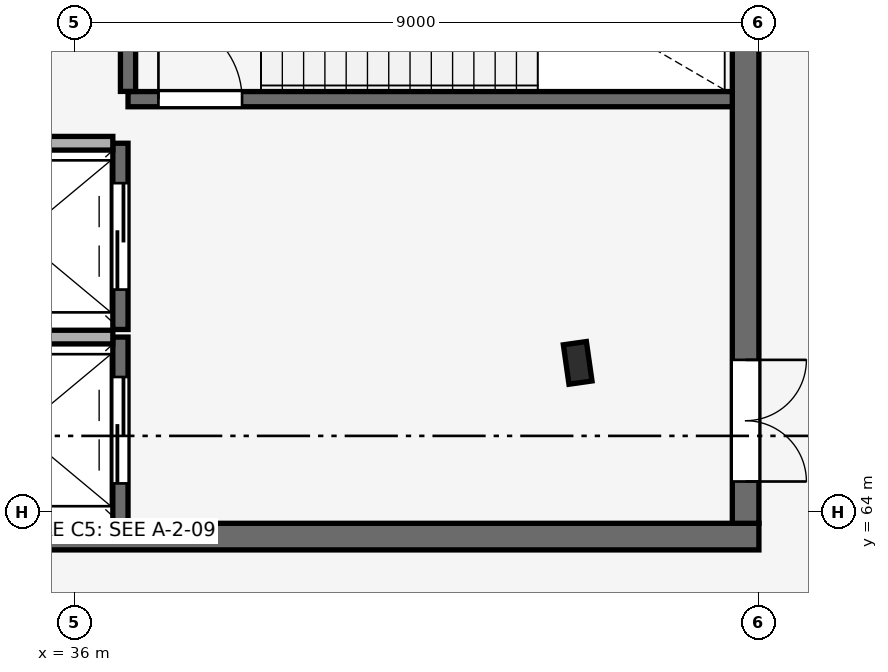
"""IFC4 building model, lengths in metres.
Left out: names, types, materials, properties, quantities, classifications, styles, units other than length and angle.
Written with IfcOpenShell. Run it as: python <this file> out.ifc"""

import sys

from ifc_helpers import new_model, si_unit, direction, frame, frame_2d, origin, origin_2d, place, context, subcontext, project, spatial, rectangle, i_section, extrude, element, fill, save


model = new_model("IFC4")
c1 = context("Model", 3, precision=1e-05, world=origin(), true_north=direction((0.0, 1.0)))
c2 = subcontext(c1, "Body", "Model", "MODEL_VIEW")
j1 = project(units=[si_unit("LENGTHUNIT", "METRE"), si_unit("PLANEANGLEUNIT", "RADIAN")], contexts=[c1])
p1 = place(None, origin())
s1 = spatial("IfcSite", under=j1, at=p1, CompositionType="ELEMENT")
p2 = place(p1, origin())
s2 = spatial("IfcBuilding", under=s1, at=p2, CompositionType="ELEMENT")
p3 = place(p2, frame((0.0, 0.0, 5.4)))
s3 = spatial("IfcBuildingStorey", under=s2, at=p3, CompositionType="ELEMENT", Elevation=5.4)
p4 = place(p3, frame((42.615, 65.96, 0.0), z_axis=(0.0, 0.0, 1.0), x_axis=(-0.989999050734, -0.141074021516, 0.0)))
e1 = element("IfcColumn", 1, at=p4, inside=s3, PredefinedType="COLUMN", context=c2, shape_type="SweptSolid", body=[
    extrude(i_section(OverallWidth=0.306, OverallDepth=0.524, WebThickness=0.021, FlangeThickness=0.04, FilletRadius=0.027, at=origin_2d()), origin(), (0.0, 0.0, 1.0), 4.8),
])
p5 = place(p3, frame((33.6, 63.675, 0.0), z_axis=(0.0, 0.0, 1.0), x_axis=(1.0, 0.0, 0.0)))
e2 = element("IfcWall", 2, at=p5, inside=s3, PredefinedType="SHEAR", context=c2, shape_type="SweptSolid", body=[
    extrude(rectangle(XDim=11.4, YDim=0.35, at=frame_2d((5.7, 0.0))), origin(), (0.0, 0.0, 1.0), 4.8),
])
p6 = place(p3, frame((44.825, 63.85, 0.0), z_axis=(0.0, 0.0, 1.0), x_axis=(0.0, 1.0, 0.0)))
e3 = element("IfcWall", 3, at=p6, inside=s3, PredefinedType="SHEAR", context=c2, shape_type="SweptSolid", body=[
    extrude(rectangle(XDim=9.3, YDim=0.35, at=frame_2d((4.65, 0.0))), origin(), (0.0, 0.0, 1.0), 4.8),
])
p7 = place(p6, frame((0.55, 0.0, 0.0)))
e4 = element("IfcOpeningElement", 4, at=p7, cuts=e3, PredefinedType="OPENING", context=c2, shape_type="SweptSolid", body=[
    extrude(rectangle(XDim=1.6, YDim=2.2, at=frame_2d((0.8, 1.1))), frame((0.0, 0.185, 0.0), z_axis=(0.0, -1.0, 0.0), x_axis=(1.0, 0.0, 0.0)), (0.0, 0.0, 1.0), 0.37),
])
p8 = place(p3, frame((36.6, 63.85, 0.0), z_axis=(0.0, 0.0, 1.0), x_axis=(0.0, 1.0, 0.0)))
e5 = element("IfcWall", 5, at=p8, inside=s3, PredefinedType="SHEAR", context=c2, shape_type="SweptSolid", body=[
    extrude(rectangle(XDim=2.45, YDim=0.2, at=frame_2d((1.225, 0.0))), origin(), (0.0, 0.0, 1.0), 4.52),
])
p9 = place(p8, frame((0.525, 0.0, 0.0)))
e6 = element("IfcOpeningElement", 6, at=p9, cuts=e5, PredefinedType="OPENING", context=c2, shape_type="SweptSolid", body=[
    extrude(rectangle(XDim=1.4, YDim=2.2, at=frame_2d((0.7, 1.1))), frame((0.0, 0.11, 0.0), z_axis=(0.0, -1.0, 0.0), x_axis=(1.0, 0.0, 0.0)), (0.0, 0.0, 1.0), 0.22),
])
p10 = place(p3, frame((34.05, 66.3, 0.0), z_axis=(0.0, 0.0, 1.0), x_axis=(1.0, 0.0, 0.0)))
e7 = element("IfcWall", 7, at=p10, inside=s3, PredefinedType="PARTITIONING", context=c2, shape_type="SweptSolid", body=[
    extrude(rectangle(XDim=2.45, YDim=0.18, at=frame_2d((1.225, 0.0))), origin(), (0.0, 0.0, 1.0), 4.8),
])
p11 = place(p3, frame((36.6, 66.4, 0.0), z_axis=(0.0, 0.0, 1.0), x_axis=(0.0, 1.0, 0.0)))
e8 = element("IfcWall", 8, at=p11, inside=s3, PredefinedType="SHEAR", context=c2, shape_type="SweptSolid", body=[
    extrude(rectangle(XDim=2.45, YDim=0.2, at=frame_2d((1.225, 0.0))), origin(), (0.0, 0.0, 1.0), 4.52),
])
p12 = place(p11, frame((0.525, 0.0, 0.0)))
e9 = element("IfcOpeningElement", 9, at=p12, cuts=e8, PredefinedType="OPENING", context=c2, shape_type="SweptSolid", body=[
    extrude(rectangle(XDim=1.4, YDim=2.2, at=frame_2d((0.7, 1.1))), frame((0.0, 0.11, 0.0), z_axis=(0.0, -1.0, 0.0), x_axis=(1.0, 0.0, 0.0)), (0.0, 0.0, 1.0), 0.22),
])
p13 = place(p3, frame((34.05, 68.85, 0.0), z_axis=(0.0, 0.0, 1.0), x_axis=(1.0, 0.0, 0.0)))
e10 = element("IfcWall", 10, at=p13, inside=s3, PredefinedType="PARTITIONING", context=c2, shape_type="SweptSolid", body=[
    extrude(rectangle(XDim=2.45, YDim=0.18, at=frame_2d((1.225, 0.0))), origin(), (0.0, 0.0, 1.0), 4.8),
])
p14 = place(p3, frame((36.7, 69.43, 0.0), z_axis=(0.0, 0.0, 1.0), x_axis=(1.0, 0.0, 0.0)))
e11 = element("IfcWall", 11, at=p14, inside=s3, PredefinedType="SHEAR", context=c2, shape_type="SweptSolid", body=[
    extrude(rectangle(XDim=7.95, YDim=0.2, at=frame_2d((3.975, 0.0))), origin(), (0.0, 0.0, 1.0), 4.8),
])
p15 = place(p14, frame((0.4, 0.0, 0.0)))
e12 = element("IfcOpeningElement", 12, at=p15, cuts=e11, PredefinedType="OPENING", context=c2, shape_type="SweptSolid", body=[
    extrude(rectangle(XDim=1.1, YDim=2.15, at=frame_2d((0.55, 1.075))), frame((0.0, 0.11, 0.0), z_axis=(0.0, -1.0, 0.0), x_axis=(1.0, 0.0, 0.0)), (0.0, 0.0, 1.0), 0.22),
])
p16 = place(p3, frame((36.7, 69.532, 0.0), z_axis=(0.0, 0.0, 1.0), x_axis=(0.0, 1.0, 0.0)))
e13 = element("IfcWall", 13, at=p16, inside=s3, PredefinedType="SHEAR", context=c2, shape_type="SweptSolid", body=[
    extrude(rectangle(XDim=3.586, YDim=0.2, at=frame_2d((1.793, 0.0))), origin(), (0.0, 0.0, 1.0), 4.8),
])
p17 = place(p9, origin())
e14 = element("IfcDoor", 14, at=p17, inside=s3, OperationType="DOUBLE_DOOR_SLIDING", PredefinedType="DOOR", context=c2, shape_type="SweptSolid", body=[
    extrude(rectangle(XDim=1.4, YDim=2.2, at=frame_2d((0.7, 1.1))), frame((0.0, 0.025, 0.0), z_axis=(0.0, -1.0, 0.0), x_axis=(1.0, 0.0, 0.0)), (0.0, 0.0, 1.0), 0.05),
])
fill(e6, e14)
p18 = place(p12, origin())
e15 = element("IfcDoor", 15, at=p18, inside=s3, OperationType="DOUBLE_DOOR_SLIDING", PredefinedType="DOOR", context=c2, shape_type="SweptSolid", body=[
    extrude(rectangle(XDim=1.4, YDim=2.2, at=frame_2d((0.7, 1.1))), frame((0.0, 0.025, 0.0), z_axis=(0.0, -1.0, 0.0), x_axis=(1.0, 0.0, 0.0)), (0.0, 0.0, 1.0), 0.05),
])
fill(e9, e15)
p19 = place(p15, frame((1.1, 0.0, 0.0), z_axis=(0.0, 0.0, 1.0), x_axis=(-1.0, 0.0, 0.0)))
e16 = element("IfcDoor", 16, at=p19, inside=s3, OperationType="SINGLE_SWING_RIGHT", PredefinedType="DOOR", context=c2, shape_type="SweptSolid", body=[
    extrude(rectangle(XDim=1.1, YDim=2.15, at=frame_2d((0.55, 1.075))), frame((0.0, 0.025, 0.0), z_axis=(0.0, -1.0, 0.0), x_axis=(1.0, 0.0, 0.0)), (0.0, 0.0, 1.0), 0.05),
])
fill(e12, e16)
p20 = place(p7, frame((1.6, 0.0, 0.0), z_axis=(0.0, 0.0, 1.0), x_axis=(-1.0, 0.0, 0.0)))
e17 = element("IfcDoor", 17, at=p20, inside=s3, OperationType="DOUBLE_DOOR_SINGLE_SWING", PredefinedType="DOOR", context=c2, shape_type="SweptSolid", body=[
    extrude(rectangle(XDim=1.6, YDim=2.2, at=frame_2d((0.8, 1.1))), frame((0.0, 0.025, 0.0), z_axis=(0.0, -1.0, 0.0), x_axis=(1.0, 0.0, 0.0)), (0.0, 0.0, 1.0), 0.05),
])
fill(e4, e17)
save(model, sys.argv[1])
